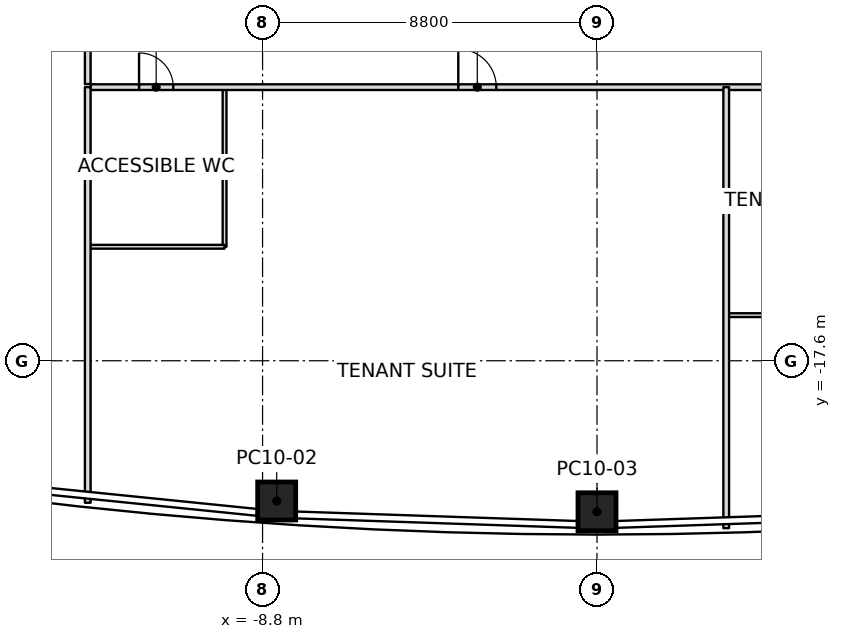
"""IFC4 building model, lengths in metres.
Left out: names, types, materials, properties, quantities, classifications, styles, units other than length and angle.
Written with IfcOpenShell. Run it as: python <this file> out.ifc"""

import sys

from ifc_helpers import new_model, si_unit, direction, frame, frame_2d, origin, origin_2d, place, context, subcontext, project, spatial, rectangle, extrude, element, fill, save


model = new_model("IFC4")
c1 = context("Model", 3, precision=1e-05, world=origin(), true_north=direction((0.0, 1.0)))
c2 = subcontext(c1, "Body", "Model", "MODEL_VIEW")
j1 = project(units=[si_unit("LENGTHUNIT", "METRE"), si_unit("PLANEANGLEUNIT", "RADIAN")], contexts=[c1])
p1 = place(None, origin())
s1 = spatial("IfcSite", under=j1, at=p1, CompositionType="ELEMENT")
p2 = place(p1, origin())
s2 = spatial("IfcBuilding", under=s1, at=p2, CompositionType="ELEMENT")
p3 = place(p2, frame((0.0, 0.0, 161.8)))
s3 = spatial("IfcBuildingStorey", under=s2, at=p3, CompositionType="ELEMENT", Elevation=161.8)
p4 = place(p3, frame((-8.428, -21.29, 0.0), z_axis=(0.008849199152, 0.01116829962, 0.999898475225), x_axis=(-0.997694684964, 0.06738008669, 0.008077097989)))
e1 = element("IfcColumn", 1, at=p4, inside=s3, PredefinedType="COLUMN", context=c2, shape_type="SweptSolid", body=[
    extrude(rectangle(XDim=1.0, YDim=1.0, at=origin_2d()), origin(), (0.0, 0.0, 1.0), 4.0),
])
p5 = place(p3, frame((0.0, -21.574, 0.0), z_axis=(0.0, 0.01141283087, 0.999934871525), x_axis=(1.0, 0.0, 0.0)))
e2 = element("IfcColumn", 2, at=p5, inside=s3, PredefinedType="COLUMN", context=c2, shape_type="SweptSolid", body=[
    extrude(rectangle(XDim=1.0, YDim=1.0, at=origin_2d()), origin(), (0.0, 0.0, 1.0), 4.0),
])
p6 = place(p3, frame((-13.4, -10.4, 0.0), z_axis=(0.0, 0.0, 1.0), x_axis=(0.0, -1.0, 0.0)))
e3 = element("IfcWall", 3, at=p6, inside=s3, PredefinedType="PARTITIONING", context=c2, shape_type="SweptSolid", body=[
    extrude(rectangle(XDim=10.937, YDim=0.15, at=frame_2d((5.468, 0.0))), origin(), (0.0, 0.0, 1.0), 3.234),
])
p7 = place(p3, frame((3.4, -10.4, 0.0), z_axis=(0.0, 0.0, 1.0), x_axis=(0.0, -1.0, 0.0)))
e4 = element("IfcWall", 4, at=p7, inside=s3, PredefinedType="PARTITIONING", context=c2, shape_type="SweptSolid", body=[
    extrude(rectangle(XDim=11.605, YDim=0.15, at=frame_2d((5.803, 0.0))), origin(), (0.0, 0.0, 1.0), 3.234),
])
p8 = place(p3, frame((-13.4, 10.32, 0.0), z_axis=(0.0, 0.0, 1.0), x_axis=(0.0, -1.0, 0.0)))
e5 = element("IfcWall", 5, at=p8, inside=s3, PredefinedType="PARTITIONING", context=c2, shape_type="SweptSolid", body=[
    extrude(rectangle(XDim=20.64, YDim=0.15, at=frame_2d((10.32, 0.0))), origin(), (0.0, 0.0, 1.0), 3.166),
])
p9 = place(p8, frame((1.57, 0.0, 0.0)))
e6 = element("IfcOpeningElement", 6, at=p9, cuts=e5, PredefinedType="OPENING", context=c2, shape_type="SweptSolid", body=[
    extrude(rectangle(XDim=0.9, YDim=2.1, at=frame_2d((0.45, 1.05))), frame((0.0, 0.075, 0.0), z_axis=(0.0, -1.0, 0.0), x_axis=(1.0, 0.0, 0.0)), (0.0, 0.0, 1.0), 0.15),
])
p10 = place(p8, frame((11.98, 0.0, 0.0)))
e7 = element("IfcOpeningElement", 7, at=p10, cuts=e5, PredefinedType="OPENING", context=c2, shape_type="SweptSolid", body=[
    extrude(rectangle(XDim=1.0, YDim=2.1, at=frame_2d((0.5, 1.05))), frame((0.0, 0.075, 0.0), z_axis=(0.0, -1.0, 0.0), x_axis=(1.0, 0.0, 0.0)), (0.0, 0.0, 1.0), 0.15),
])
p11 = place(p3, frame((-13.32, -10.4, 0.0), z_axis=(0.0, 0.0, 1.0), x_axis=(1.0, 0.0, 0.0)))
e8 = element("IfcWall", 8, at=p11, inside=s3, PredefinedType="PARTITIONING", context=c2, shape_type="SweptSolid", body=[
    extrude(rectangle(XDim=26.64, YDim=0.15, at=frame_2d((13.32, 0.0))), origin(), (0.0, 0.0, 1.0), 3.317),
])
p12 = place(p11, frame((1.27, 0.0, 0.0)))
e9 = element("IfcOpeningElement", 9, at=p12, cuts=e8, PredefinedType="OPENING", context=c2, shape_type="SweptSolid", body=[
    extrude(rectangle(XDim=0.9, YDim=2.1, at=frame_2d((0.45, 1.05))), frame((0.0, 0.075, 0.0), z_axis=(0.0, -1.0, 0.0), x_axis=(1.0, 0.0, 0.0)), (0.0, 0.0, 1.0), 0.15),
])
p13 = place(p11, frame((9.67, 0.0, 0.0)))
e10 = element("IfcOpeningElement", 10, at=p13, cuts=e8, PredefinedType="OPENING", context=c2, shape_type="SweptSolid", body=[
    extrude(rectangle(XDim=1.0, YDim=2.1, at=frame_2d((0.5, 1.05))), frame((0.0, 0.075, 0.0), z_axis=(0.0, -1.0, 0.0), x_axis=(1.0, 0.0, 0.0)), (0.0, 0.0, 1.0), 0.15),
])
p14 = place(p11, frame((18.77, 0.0, 0.0)))
e11 = element("IfcOpeningElement", 11, at=p14, cuts=e8, PredefinedType="OPENING", context=c2, shape_type="SweptSolid", body=[
    extrude(rectangle(XDim=0.9, YDim=2.1, at=frame_2d((0.45, 1.05))), frame((0.0, 0.075, 0.0), z_axis=(0.0, -1.0, 0.0), x_axis=(1.0, 0.0, 0.0)), (0.0, 0.0, 1.0), 0.15),
])
p15 = place(p11, frame((23.77, 0.0, 0.0)))
e12 = element("IfcOpeningElement", 12, at=p15, cuts=e8, PredefinedType="OPENING", context=c2, shape_type="SweptSolid", body=[
    extrude(rectangle(XDim=1.0, YDim=2.1, at=frame_2d((0.5, 1.05))), frame((0.0, 0.075, 0.0), z_axis=(0.0, -1.0, 0.0), x_axis=(1.0, 0.0, 0.0)), (0.0, 0.0, 1.0), 0.15),
])
p16 = place(p3, frame((-9.8, -10.43, 0.0), z_axis=(0.0, 0.0, 1.0), x_axis=(0.0, -1.0, 0.0)))
e13 = element("IfcWall", 13, at=p16, inside=s3, PredefinedType="PARTITIONING", context=c2, shape_type="SweptSolid", body=[
    extrude(rectangle(XDim=4.17, YDim=0.1, at=frame_2d((2.085, 0.0))), origin(), (0.0, 0.0, 1.0), 3.45),
])
p17 = place(p3, frame((-9.8, -14.6, 0.0), z_axis=(0.0, 0.0, 1.0), x_axis=(-1.0, 0.0, 0.0)))
e14 = element("IfcWall", 14, at=p17, inside=s3, PredefinedType="PARTITIONING", context=c2, shape_type="SweptSolid", body=[
    extrude(rectangle(XDim=3.57, YDim=0.1, at=frame_2d((1.785, 0.0))), origin(), (0.0, 0.0, 1.0), 3.393),
])
p18 = place(p3, frame((8.4, -16.4, 0.0), z_axis=(0.0, 0.0, 1.0), x_axis=(-1.0, 0.0, 0.0)))
e15 = element("IfcWall", 15, at=p18, inside=s3, PredefinedType="PARTITIONING", context=c2, shape_type="SweptSolid", body=[
    extrude(rectangle(XDim=4.97, YDim=0.1, at=frame_2d((2.485, 0.0))), origin(), (0.0, 0.0, 1.0), 3.317),
])
p19 = place(p12, origin())
e16 = element("IfcDoor", 16, at=p19, inside=s3, OperationType="SINGLE_SWING_LEFT", PredefinedType="DOOR", context=c2, shape_type="SweptSolid", body=[
    extrude(rectangle(XDim=0.9, YDim=2.1, at=frame_2d((0.45, 1.05))), frame((0.0, 0.025, 0.0), z_axis=(0.0, -1.0, 0.0), x_axis=(1.0, 0.0, 0.0)), (0.0, 0.0, 1.0), 0.05),
])
fill(e9, e16)
p20 = place(p13, origin())
e17 = element("IfcDoor", 17, at=p20, inside=s3, OperationType="SINGLE_SWING_RIGHT", PredefinedType="DOOR", context=c2, shape_type="SweptSolid", body=[
    extrude(rectangle(XDim=1.0, YDim=2.1, at=frame_2d((0.5, 1.05))), frame((0.0, 0.025, 0.0), z_axis=(0.0, -1.0, 0.0), x_axis=(1.0, 0.0, 0.0)), (0.0, 0.0, 1.0), 0.05),
])
fill(e10, e17)
save(model, sys.argv[1])
